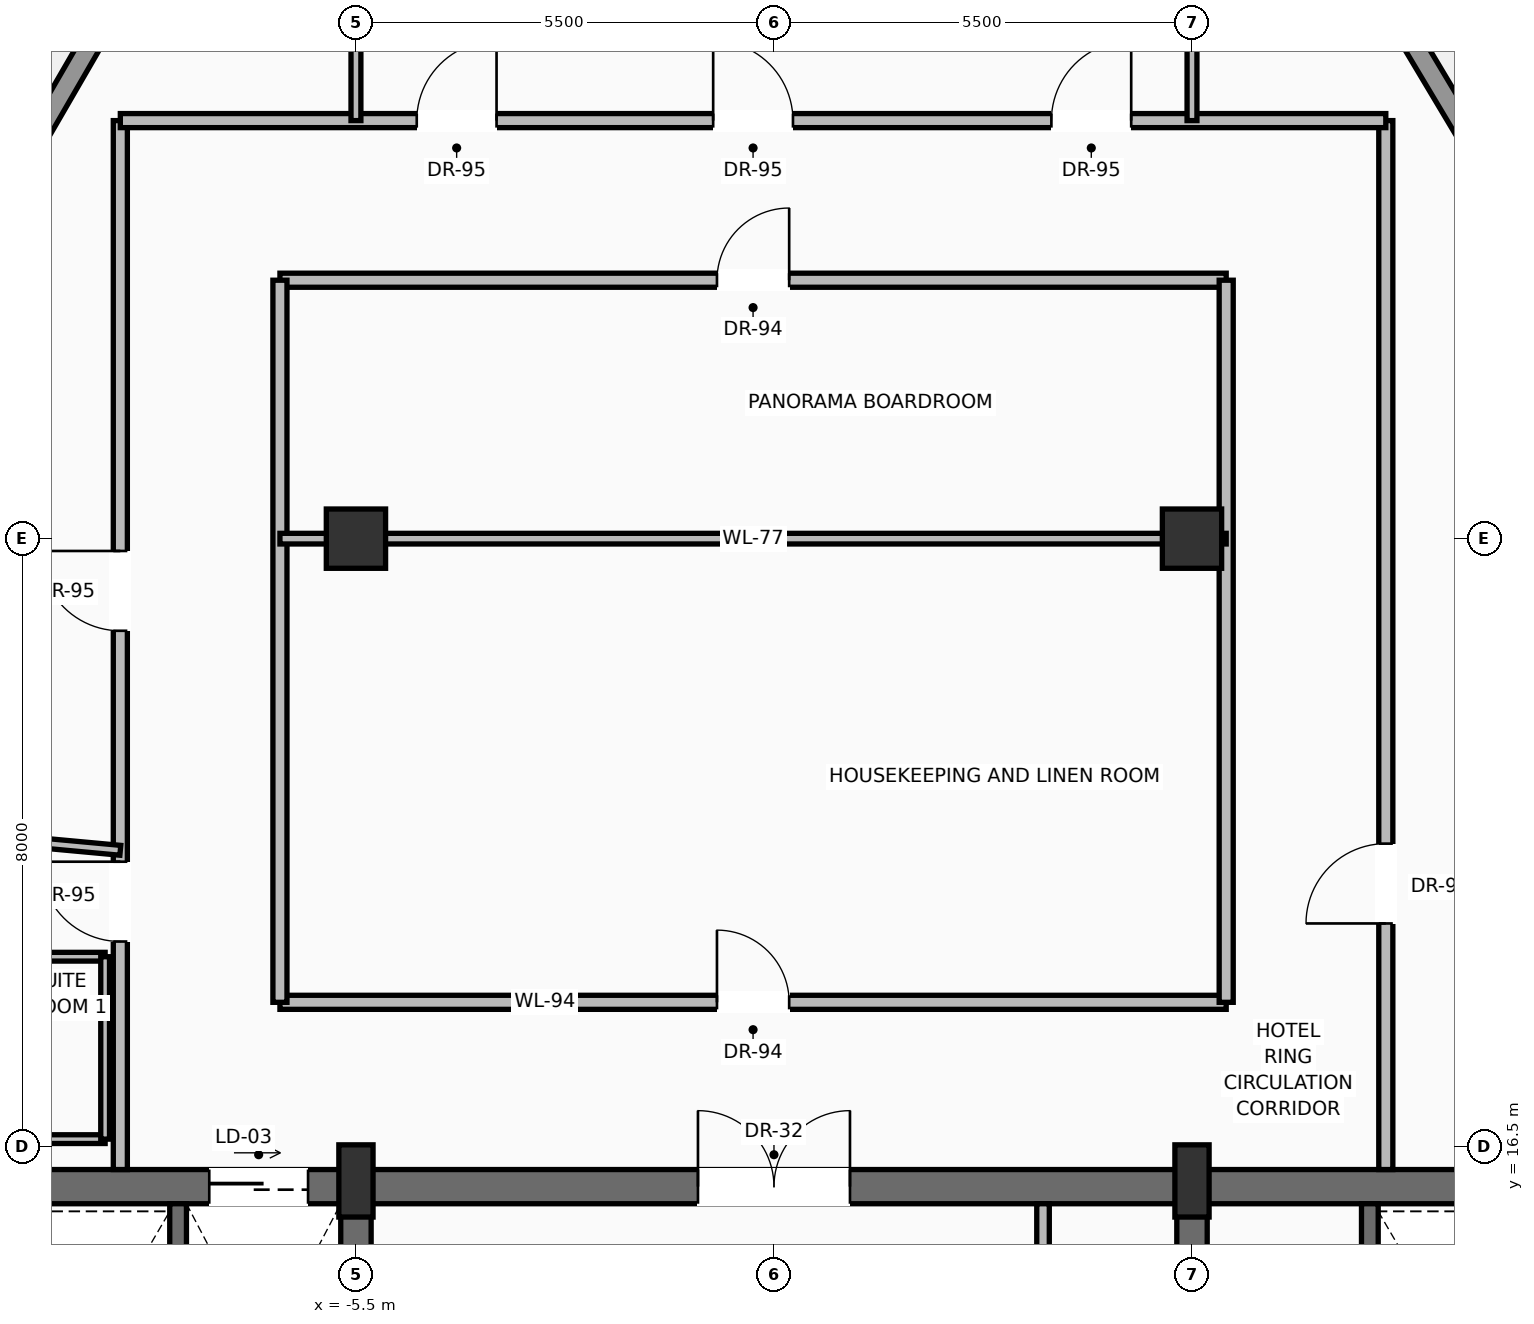
"""IFC4 building model, lengths in metres.
Left out: names, types, materials, properties, quantities, classifications, styles, units other than length and angle.
Written with IfcOpenShell. Run it as: python <this file> out.ifc"""

import sys

from ifc_helpers import new_model, si_unit, direction, frame, frame_2d, origin, origin_2d, place, context, subcontext, project, spatial, rectangle, extrude, source, transform, mapped, element, fill, save


model = new_model("IFC4")
c1 = context("Model", 3, precision=1e-05, world=origin(), true_north=direction((0.0, 1.0)))
c2 = subcontext(c1, "Body", "Model", "MODEL_VIEW")
j1 = project(units=[si_unit("LENGTHUNIT", "METRE"), si_unit("PLANEANGLEUNIT", "RADIAN")], contexts=[c1])
p1 = place(None, origin())
s1 = spatial("IfcSite", under=j1, at=p1, CompositionType="ELEMENT")
p2 = place(p1, origin())
s2 = spatial("IfcBuilding", under=s1, at=p2, CompositionType="ELEMENT")
p3 = place(p2, frame((0.0, 0.0, 269.55)))
s3 = spatial("IfcBuildingStorey", under=s2, at=p3, CompositionType="ELEMENT", Elevation=269.55)
p4 = place(p3, frame((-10.6, 15.975, 0.0), z_axis=(0.0, 0.0, 1.0), x_axis=(1.0, 0.0, 0.0)))
e1 = element("IfcWall", 1, at=p4, inside=s3, PredefinedType="SHEAR", context=c2, shape_type="SweptSolid", body=[
    extrude(rectangle(XDim=21.2, YDim=0.45, at=frame_2d((10.6, 0.0))), origin(), (0.0, 0.0, 1.0), 3.24),
])
p5 = place(p4, frame((3.17, 0.0, 0.0)))
e2 = element("IfcOpeningElement", 2, at=p5, cuts=e1, PredefinedType="OPENING", context=c2, shape_type="SweptSolid", body=[
    extrude(rectangle(XDim=1.3, YDim=2.3, at=frame_2d((0.65, 1.15))), frame((0.0, 0.235, 0.0), z_axis=(0.0, -1.0, 0.0), x_axis=(1.0, 0.0, 0.0)), (0.0, 0.0, 1.0), 0.47),
])
p6 = place(p4, frame((9.6, 0.0, 0.0)))
e3 = element("IfcOpeningElement", 3, at=p6, cuts=e1, PredefinedType="OPENING", context=c2, shape_type="SweptSolid", body=[
    extrude(rectangle(XDim=2.0, YDim=2.4, at=frame_2d((1.0, 1.2))), frame((0.0, 0.235, 0.0), z_axis=(0.0, -1.0, 0.0), x_axis=(1.0, 0.0, 0.0)), (0.0, 0.0, 1.0), 0.47),
])
p7 = place(p3, frame((-5.5, 0.625, 0.0), z_axis=(0.0, 0.0, 1.0), x_axis=(0.0, 1.0, 0.0)))
e4 = element("IfcWall", 4, at=p7, inside=s3, PredefinedType="SHEAR", context=c2, shape_type="SweptSolid", body=[
    extrude(rectangle(XDim=15.35, YDim=0.4, at=frame_2d((7.675, 0.0))), origin(), (0.0, 0.0, 1.0), 3.24),
])
p8 = place(p7, frame((8.875, 0.0, 0.0)))
e5 = element("IfcOpeningElement", 5, at=p8, cuts=e4, PredefinedType="OPENING", context=c2, shape_type="SweptSolid", body=[
    extrude(rectangle(XDim=1.1, YDim=2.2, at=frame_2d((0.55, 1.1))), frame((0.0, 0.21, 0.0), z_axis=(0.0, -1.0, 0.0), x_axis=(1.0, 0.0, 0.0)), (0.0, 0.0, 1.0), 0.42),
])
p9 = place(p3, frame((5.5, 0.625, 0.0), z_axis=(0.0, 0.0, 1.0), x_axis=(0.0, 1.0, 0.0)))
e6 = element("IfcWall", 6, at=p9, inside=s3, PredefinedType="SHEAR", context=c2, shape_type="SweptSolid", body=[
    extrude(rectangle(XDim=15.35, YDim=0.4, at=frame_2d((7.675, 0.0))), origin(), (0.0, 0.0, 1.0), 3.24),
])
p10 = place(p9, frame((8.875, 0.0, 0.0)))
e7 = element("IfcOpeningElement", 7, at=p10, cuts=e6, PredefinedType="OPENING", context=c2, shape_type="SweptSolid", body=[
    extrude(rectangle(XDim=1.1, YDim=2.2, at=frame_2d((0.55, 1.1))), frame((0.0, 0.21, 0.0), z_axis=(0.0, -1.0, 0.0), x_axis=(1.0, 0.0, 0.0)), (0.0, 0.0, 1.0), 0.42),
])
m1 = source(origin(), c2, "Body", "SweptSolid", [
    extrude(rectangle(XDim=0.45, YDim=0.95, at=origin_2d()), origin(), (0.0, 0.0, 1.0), 3.45),
])
for number, where, z_axis, x_axis in (
    (8, (-5.5, 16.05, 0.0), (0.0, 0.0, 1.0), (1.0, 0.0, 0.0)),
    (9, (5.5, 16.05, 0.0), (0.0, 0.0, 1.0), (1.0, 0.0, 0.0)),
):
    element("IfcColumn", number, at=place(p3, frame(where, z_axis=z_axis, x_axis=x_axis)), inside=s3, PredefinedType="PILASTER", context=c2, shape_type="MappedRepresentation", body=[
        mapped(m1, transform((0.0, 0.0, 0.0), scale=1.0)),
    ])
m2 = source(origin(), c2, "Body", "SweptSolid", [
    extrude(rectangle(XDim=0.78, YDim=0.78, at=origin_2d()), origin(), (0.0, 0.0, 1.0), 3.45),
])
for number, where, z_axis, x_axis in (
    (10, (-5.5, 24.5, 0.0), (0.0, 0.0, 1.0), (1.0, 0.0, 0.0)),
    (11, (5.5, 24.5, 0.0), (0.0, 0.0, 1.0), (1.0, 0.0, 0.0)),
):
    element("IfcColumn", number, at=place(p3, frame(where, z_axis=z_axis, x_axis=x_axis)), inside=s3, PredefinedType="COLUMN", context=c2, shape_type="MappedRepresentation", body=[
        mapped(m2, transform((0.0, 0.0, 0.0), scale=1.0)),
    ])
p11 = place(p3, frame((-18.621, 14.387, 0.0), z_axis=(0.0, 0.0, 1.0), x_axis=(0.501208020252, 0.865326828681, 0.0)))
e12 = element("IfcWall", 12, at=p11, inside=s3, PredefinedType="SOLIDWALL", context=c2, shape_type="SweptSolid", body=[
    extrude(rectangle(XDim=20.003, YDim=0.28, at=frame_2d((10.001, 0.0))), origin(), (0.0, 0.0, 1.0), 2.82),
])
p12 = place(p11, frame((4.801, 0.0, 0.0)))
e13 = element("IfcOpeningElement", 13, at=p12, cuts=e12, PredefinedType="OPENING", context=c2, shape_type="SweptSolid", body=[
    extrude(rectangle(XDim=1.6, YDim=2.35, at=frame_2d((0.8, 1.175))), frame((0.0, 0.15, 0.0), z_axis=(0.0, -1.0, 0.0), x_axis=(1.0, 0.0, 0.0)), (0.0, 0.0, 1.0), 0.3),
])
p13 = place(p11, frame((13.602, 0.0, 0.9)))
e14 = element("IfcOpeningElement", 14, at=p13, cuts=e12, PredefinedType="OPENING", context=c2, shape_type="SweptSolid", body=[
    extrude(rectangle(XDim=2.0, YDim=1.75, at=frame_2d((1.0, 0.875))), frame((0.0, 0.15, 0.0), z_axis=(0.0, -1.0, 0.0), x_axis=(1.0, 0.0, 0.0)), (0.0, 0.0, 1.0), 0.3),
])
p14 = place(p3, frame((7.942, 31.807, 0.0), z_axis=(0.0, 0.0, 1.0), x_axis=(0.513039751496, -0.858364848642, 0.0)))
e15 = element("IfcWall", 15, at=p14, inside=s3, PredefinedType="SOLIDWALL", context=c2, shape_type="SweptSolid", body=[
    extrude(rectangle(XDim=19.959, YDim=0.28, at=frame_2d((9.979, 0.0))), origin(), (0.0, 0.0, 1.0), 2.82),
])
p15 = place(p14, frame((4.79, 0.0, 0.0)))
e16 = element("IfcOpeningElement", 16, at=p15, cuts=e15, PredefinedType="OPENING", context=c2, shape_type="SweptSolid", body=[
    extrude(rectangle(XDim=1.6, YDim=2.35, at=frame_2d((0.8, 1.175))), frame((0.0, 0.15, 0.0), z_axis=(0.0, -1.0, 0.0), x_axis=(1.0, 0.0, 0.0)), (0.0, 0.0, 1.0), 0.3),
])
p16 = place(p14, frame((13.572, 0.0, 0.9)))
e17 = element("IfcOpeningElement", 17, at=p16, cuts=e15, PredefinedType="OPENING", context=c2, shape_type="SweptSolid", body=[
    extrude(rectangle(XDim=2.0, YDim=1.75, at=frame_2d((1.0, 0.875))), frame((0.0, 0.15, 0.0), z_axis=(0.0, -1.0, 0.0), x_axis=(1.0, 0.0, 0.0)), (0.0, 0.0, 1.0), 0.3),
])
for number, where, z_axis, x_axis in (
    (18, (-7.84, 11.87, 0.0), (0.0, 0.0, 1.0), (0.0, 1.0, 0.0)),
    (19, (7.84, 11.87, 0.0), (0.0, 0.0, 1.0), (0.0, 1.0, 0.0)),
):
    element("IfcWall", number, at=place(p3, frame(where, z_axis=z_axis, x_axis=x_axis)), inside=s3, PredefinedType="SOLIDWALL", context=c2, shape_type="SweptSolid", body=[
        extrude(rectangle(XDim=3.88, YDim=0.22, at=frame_2d((1.94, 0.0))), origin(), (0.0, 0.0, 1.0), 3.24),
    ])
p17 = place(p3, frame((3.54, 11.22, 0.0), z_axis=(0.0, 0.0, 1.0), x_axis=(0.0, 1.0, 0.0)))
e20 = element("IfcWall", 20, at=p17, inside=s3, PredefinedType="PARTITIONING", context=c2, shape_type="SweptSolid", body=[
    extrude(rectangle(XDim=4.53, YDim=0.165, at=frame_2d((2.265, 0.0))), origin(), (0.0, 0.0, 1.0), 3.232),
])
p18 = place(p17, frame((1.25, 0.0, 0.0)))
e21 = element("IfcOpeningElement", 21, at=p18, cuts=e20, PredefinedType="OPENING", context=c2, shape_type="SweptSolid", body=[
    extrude(rectangle(XDim=0.9, YDim=2.1, at=frame_2d((0.45, 1.05))), frame((0.0, 0.093, 0.0), z_axis=(0.0, -1.0, 0.0), x_axis=(1.0, 0.0, 0.0)), (0.0, 0.0, 1.0), 0.185),
])
p19 = place(p3, frame((-6.5, 18.4, 0.0), z_axis=(0.0, 0.0, 1.0), x_axis=(1.0, 0.0, 0.0)))
e22 = element("IfcWall", 22, at=p19, inside=s3, PredefinedType="PARTITIONING", context=c2, shape_type="SweptSolid", body=[
    extrude(rectangle(XDim=12.45, YDim=0.185, at=frame_2d((6.225, 0.0))), origin(), (0.0, 0.0, 1.0), 3.232),
])
p20 = place(p19, frame((5.75, 0.0, 0.0)))
e23 = element("IfcOpeningElement", 23, at=p20, cuts=e22, PredefinedType="OPENING", context=c2, shape_type="SweptSolid", body=[
    extrude(rectangle(XDim=0.95, YDim=2.2, at=frame_2d((0.475, 1.1))), frame((0.0, 0.103, 0.0), z_axis=(0.0, -1.0, 0.0), x_axis=(1.0, 0.0, 0.0)), (0.0, 0.0, 1.0), 0.205),
])
p21 = place(p3, frame((-6.5, 27.9, 0.0), z_axis=(0.0, 0.0, 1.0), x_axis=(1.0, 0.0, 0.0)))
e24 = element("IfcWall", 24, at=p21, inside=s3, PredefinedType="PARTITIONING", context=c2, shape_type="SweptSolid", body=[
    extrude(rectangle(XDim=12.45, YDim=0.185, at=frame_2d((6.225, 0.0))), origin(), (0.0, 0.0, 1.0), 2.885),
])
p22 = place(p21, frame((5.75, 0.0, 0.0)))
e25 = element("IfcOpeningElement", 25, at=p22, cuts=e24, PredefinedType="OPENING", context=c2, shape_type="SweptSolid", body=[
    extrude(rectangle(XDim=0.95, YDim=2.2, at=frame_2d((0.475, 1.1))), frame((0.0, 0.103, 0.0), z_axis=(0.0, -1.0, 0.0), x_axis=(1.0, 0.0, 0.0)), (0.0, 0.0, 1.0), 0.205),
])
for number, where, z_axis, x_axis in (
    (26, (-6.5, 18.4, 0.0), (0.0, 0.0, 1.0), (0.0, 1.0, 0.0)),
    (27, (5.95, 18.4, 0.0), (0.0, 0.0, 1.0), (0.0, 1.0, 0.0)),
):
    element("IfcWall", number, at=place(p3, frame(where, z_axis=z_axis, x_axis=x_axis)), inside=s3, PredefinedType="PARTITIONING", context=c2, shape_type="SweptSolid", body=[
        extrude(rectangle(XDim=9.5, YDim=0.185, at=frame_2d((4.75, 0.0))), origin(), (0.0, 0.0, 1.0), 3.232),
    ])
p23 = place(p3, frame((-8.6, 16.2, 0.0), z_axis=(0.0, 0.0, 1.0), x_axis=(0.0, 1.0, 0.0)))
e28 = element("IfcWall", 28, at=p23, inside=s3, PredefinedType="PARTITIONING", context=c2, shape_type="SweptSolid", body=[
    extrude(rectangle(XDim=13.8, YDim=0.185, at=frame_2d((6.9, 0.0))), origin(), (0.0, 0.0, 1.0), 3.232),
])
p24 = place(p23, frame((3.0, 0.0, 0.0)))
e29 = element("IfcOpeningElement", 29, at=p24, cuts=e28, PredefinedType="OPENING", context=c2, shape_type="SweptSolid", body=[
    extrude(rectangle(XDim=1.05, YDim=2.25, at=frame_2d((0.525, 1.125))), frame((0.0, 0.103, 0.0), z_axis=(0.0, -1.0, 0.0), x_axis=(1.0, 0.0, 0.0)), (0.0, 0.0, 1.0), 0.205),
])
p25 = place(p23, frame((7.088, 0.0, 0.0)))
e30 = element("IfcOpeningElement", 30, at=p25, cuts=e28, PredefinedType="OPENING", context=c2, shape_type="SweptSolid", body=[
    extrude(rectangle(XDim=1.05, YDim=2.25, at=frame_2d((0.525, 1.125))), frame((0.0, 0.103, 0.0), z_axis=(0.0, -1.0, 0.0), x_axis=(1.0, 0.0, 0.0)), (0.0, 0.0, 1.0), 0.205),
])
p26 = place(p3, frame((8.05, 16.2, 0.0), z_axis=(0.0, 0.0, 1.0), x_axis=(0.0, 1.0, 0.0)))
e31 = element("IfcWall", 31, at=p26, inside=s3, PredefinedType="PARTITIONING", context=c2, shape_type="SweptSolid", body=[
    extrude(rectangle(XDim=13.8, YDim=0.185, at=frame_2d((6.9, 0.0))), origin(), (0.0, 0.0, 1.0), 3.232),
])
p27 = place(p26, frame((3.238, 0.0, 0.0)))
e32 = element("IfcOpeningElement", 32, at=p27, cuts=e31, PredefinedType="OPENING", context=c2, shape_type="SweptSolid", body=[
    extrude(rectangle(XDim=1.05, YDim=2.25, at=frame_2d((0.525, 1.125))), frame((0.0, 0.103, 0.0), z_axis=(0.0, -1.0, 0.0), x_axis=(1.0, 0.0, 0.0)), (0.0, 0.0, 1.0), 0.205),
])
p28 = place(p3, frame((-8.6, 30.0, 0.0), z_axis=(0.0, 0.0, 1.0), x_axis=(1.0, 0.0, 0.0)))
e33 = element("IfcWall", 33, at=p28, inside=s3, PredefinedType="PARTITIONING", context=c2, shape_type="SweptSolid", body=[
    extrude(rectangle(XDim=16.65, YDim=0.185, at=frame_2d((8.325, 0.0))), origin(), (0.0, 0.0, 1.0), 3.232),
])
p29 = place(p28, frame((3.9, 0.0, 0.0)))
e34 = element("IfcOpeningElement", 34, at=p29, cuts=e33, PredefinedType="OPENING", context=c2, shape_type="SweptSolid", body=[
    extrude(rectangle(XDim=1.05, YDim=2.25, at=frame_2d((0.525, 1.125))), frame((0.0, 0.103, 0.0), z_axis=(0.0, -1.0, 0.0), x_axis=(1.0, 0.0, 0.0)), (0.0, 0.0, 1.0), 0.205),
])
p30 = place(p28, frame((7.8, 0.0, 0.0)))
e35 = element("IfcOpeningElement", 35, at=p30, cuts=e33, PredefinedType="OPENING", context=c2, shape_type="SweptSolid", body=[
    extrude(rectangle(XDim=1.05, YDim=2.25, at=frame_2d((0.525, 1.125))), frame((0.0, 0.103, 0.0), z_axis=(0.0, -1.0, 0.0), x_axis=(1.0, 0.0, 0.0)), (0.0, 0.0, 1.0), 0.205),
])
p31 = place(p28, frame((12.25, 0.0, 0.0)))
e36 = element("IfcOpeningElement", 36, at=p31, cuts=e33, PredefinedType="OPENING", context=c2, shape_type="SweptSolid", body=[
    extrude(rectangle(XDim=1.05, YDim=2.25, at=frame_2d((0.525, 1.125))), frame((0.0, 0.103, 0.0), z_axis=(0.0, -1.0, 0.0), x_axis=(1.0, 0.0, 0.0)), (0.0, 0.0, 1.0), 0.205),
])
p32 = place(p3, frame((-6.5, 24.5, 0.0), z_axis=(0.0, 0.0, 1.0), x_axis=(1.0, 0.0, 0.0)))
e37 = element("IfcWall", 37, at=p32, inside=s3, PredefinedType="PARTITIONING", context=c2, shape_type="SweptSolid", body=[
    extrude(rectangle(XDim=12.45, YDim=0.14, at=frame_2d((6.225, 0.0))), origin(), (0.0, 0.0, 1.0), 2.683),
])
p33 = place(p3, frame((-5.5, 30.0, 0.0), z_axis=(0.0, 0.0, 1.0), x_axis=(0.0, 1.0, 0.0)))
e38 = element("IfcWall", 38, at=p33, inside=s3, PredefinedType="PARTITIONING", context=c2, shape_type="SweptSolid", body=[
    extrude(rectangle(XDim=7.3, YDim=0.13, at=frame_2d((3.65, 0.0))), origin(), (0.0, 0.0, 1.0), 2.683),
])
p34 = place(p3, frame((5.5, 30.0, 0.0), z_axis=(0.0, 0.0, 1.0), x_axis=(0.0, 1.0, 0.0)))
e39 = element("IfcWall", 39, at=p34, inside=s3, PredefinedType="PARTITIONING", context=c2, shape_type="SweptSolid", body=[
    extrude(rectangle(XDim=6.146, YDim=0.13, at=frame_2d((3.073, 0.0))), origin(), (0.0, 0.0, 1.0), 2.683),
])
for number, where, z_axis, x_axis in (
    (40, (-11.45, 16.6, 0.0), (0.0, 0.0, 1.0), (1.0, 0.0, 0.0)),
    (41, (-11.45, 19.0, 0.0), (0.0, 0.0, 1.0), (1.0, 0.0, 0.0)),
):
    element("IfcWall", number, at=place(p3, frame(where, z_axis=z_axis, x_axis=x_axis)), inside=s3, PredefinedType="PARTITIONING", context=c2, shape_type="SweptSolid", body=[
        extrude(rectangle(XDim=2.65, YDim=0.115, at=frame_2d((1.325, 0.0))), origin(), (0.0, 0.0, 1.0), 3.232),
    ])
p35 = place(p3, frame((-8.8, 16.6, 0.0), z_axis=(0.0, 0.0, 1.0), x_axis=(0.0, 1.0, 0.0)))
e42 = element("IfcWall", 42, at=p35, inside=s3, PredefinedType="PARTITIONING", context=c2, shape_type="SweptSolid", body=[
    extrude(rectangle(XDim=2.4, YDim=0.115, at=frame_2d((1.2, 0.0))), origin(), (0.0, 0.0, 1.0), 3.232),
])
p36 = place(p3, frame((-14.949, 20.986, 0.0), z_axis=(0.0, 0.0, 1.0), x_axis=(0.995772122892, -0.091857929817, 0.0)))
e43 = element("IfcWall", 43, at=p36, inside=s3, PredefinedType="PARTITIONING", context=c2, shape_type="SweptSolid", body=[
    extrude(rectangle(XDim=6.376, YDim=0.13, at=frame_2d((3.188, 0.0))), origin(), (0.0, 0.0, 1.0), 3.232),
])
m3 = source(origin(), c2, "Body", "SweptSolid", [
    extrude(rectangle(XDim=1.3, YDim=2.3, at=frame_2d((0.65, 1.15))), frame((0.0, 0.025, 0.0), z_axis=(0.0, -1.0, 0.0), x_axis=(1.0, 0.0, 0.0)), (0.0, 0.0, 1.0), 0.05),
])
p37 = place(p5, origin())
e44 = element("IfcDoor", 44, at=p37, inside=s3, OperationType="SLIDING_TO_RIGHT", PredefinedType="DOOR", context=c2, shape_type="MappedRepresentation", body=[
    mapped(m3, transform((0.0, 0.0, 0.0), scale=1.0)),
])
fill(e2, e44)
m4 = source(origin(), c2, "Body", "SweptSolid", [
    extrude(rectangle(XDim=2.0, YDim=2.4, at=frame_2d((1.0, 1.2))), frame((0.0, 0.025, 0.0), z_axis=(0.0, -1.0, 0.0), x_axis=(1.0, 0.0, 0.0)), (0.0, 0.0, 1.0), 0.05),
])
p38 = place(p6, origin())
e45 = element("IfcDoor", 45, at=p38, inside=s3, OperationType="DOUBLE_DOOR_SINGLE_SWING", PredefinedType="DOOR", context=c2, shape_type="MappedRepresentation", body=[
    mapped(m4, transform((0.0, 0.0, 0.0), scale=1.0)),
])
fill(e3, e45)
m5 = source(origin(), c2, "Body", "SweptSolid", [
    extrude(rectangle(XDim=0.95, YDim=2.2, at=frame_2d((0.475, 1.1))), frame((0.0, 0.025, 0.0), z_axis=(0.0, -1.0, 0.0), x_axis=(1.0, 0.0, 0.0)), (0.0, 0.0, 1.0), 0.05),
])
p39 = place(p20, origin())
e46 = element("IfcDoor", 46, at=p39, inside=s3, OperationType="SINGLE_SWING_LEFT", PredefinedType="DOOR", context=c2, shape_type="MappedRepresentation", body=[
    mapped(m5, transform((0.0, 0.0, 0.0), scale=1.0)),
])
fill(e23, e46)
p40 = place(p22, origin())
e47 = element("IfcDoor", 47, at=p40, inside=s3, OperationType="SINGLE_SWING_RIGHT", PredefinedType="DOOR", context=c2, shape_type="MappedRepresentation", body=[
    mapped(m5, transform((0.0, 0.0, 0.0), scale=1.0)),
])
fill(e25, e47)
m6 = source(origin(), c2, "Body", "SweptSolid", [
    extrude(rectangle(XDim=1.05, YDim=2.25, at=frame_2d((0.525, 1.125))), frame((0.0, 0.025, 0.0), z_axis=(0.0, -1.0, 0.0), x_axis=(1.0, 0.0, 0.0)), (0.0, 0.0, 1.0), 0.05),
])
p41 = place(p24, origin())
e48 = element("IfcDoor", 48, at=p41, inside=s3, OperationType="SINGLE_SWING_RIGHT", PredefinedType="DOOR", context=c2, shape_type="MappedRepresentation", body=[
    mapped(m6, transform((0.0, 0.0, 0.0), scale=1.0)),
])
fill(e29, e48)
p42 = place(p25, origin())
e49 = element("IfcDoor", 49, at=p42, inside=s3, OperationType="SINGLE_SWING_RIGHT", PredefinedType="DOOR", context=c2, shape_type="MappedRepresentation", body=[
    mapped(m6, transform((0.0, 0.0, 0.0), scale=1.0)),
])
fill(e30, e49)
p43 = place(p27, origin())
e50 = element("IfcDoor", 50, at=p43, inside=s3, OperationType="SINGLE_SWING_LEFT", PredefinedType="DOOR", context=c2, shape_type="MappedRepresentation", body=[
    mapped(m6, transform((0.0, 0.0, 0.0), scale=1.0)),
])
fill(e32, e50)
p44 = place(p29, origin())
e51 = element("IfcDoor", 51, at=p44, inside=s3, OperationType="SINGLE_SWING_RIGHT", PredefinedType="DOOR", context=c2, shape_type="MappedRepresentation", body=[
    mapped(m6, transform((0.0, 0.0, 0.0), scale=1.0)),
])
fill(e34, e51)
p45 = place(p30, origin())
e52 = element("IfcDoor", 52, at=p45, inside=s3, OperationType="SINGLE_SWING_LEFT", PredefinedType="DOOR", context=c2, shape_type="MappedRepresentation", body=[
    mapped(m6, transform((0.0, 0.0, 0.0), scale=1.0)),
])
fill(e35, e52)
p46 = place(p31, origin())
e53 = element("IfcDoor", 53, at=p46, inside=s3, OperationType="SINGLE_SWING_RIGHT", PredefinedType="DOOR", context=c2, shape_type="MappedRepresentation", body=[
    mapped(m6, transform((0.0, 0.0, 0.0), scale=1.0)),
])
fill(e36, e53)
save(model, sys.argv[1])
